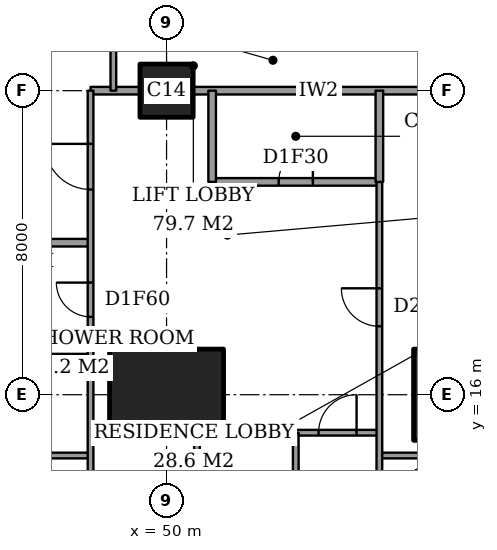
"""IFC4 building model, lengths in metres.
Left out: names, types, materials, properties, quantities, classifications, styles, units other than length and angle.
Written with IfcOpenShell. Run it as: python <this file> out.ifc"""

import sys

from ifc_helpers import new_model, si_unit, direction, frame, frame_2d, origin, origin_2d, place, context, subcontext, project, spatial, rectangle, extrude, element, fill, save


model = new_model("IFC4")
c1 = context("Model", 3, precision=1e-05, world=origin(), true_north=direction((0.0, 1.0)))
c2 = subcontext(c1, "Body", "Model", "MODEL_VIEW")
j1 = project(units=[si_unit("LENGTHUNIT", "METRE"), si_unit("PLANEANGLEUNIT", "RADIAN")], contexts=[c1])
p1 = place(None, origin())
s1 = spatial("IfcSite", under=j1, at=p1, CompositionType="ELEMENT")
p2 = place(p1, origin())
s2 = spatial("IfcBuilding", under=s1, at=p2, CompositionType="ELEMENT")
p3 = place(p2, frame((0.0, 0.0, 287.1)))
s3 = spatial("IfcBuildingStorey", under=s2, at=p3, CompositionType="ELEMENT", Elevation=287.1)
p4 = place(p3, frame((50.0, 16.0, 0.0), z_axis=(0.0, 0.0, 1.0), x_axis=(1.0, 0.0, 0.0)))
e1 = element("IfcColumn", 1, at=p4, inside=s3, PredefinedType="COLUMN", context=c2, shape_type="SweptSolid", body=[
    extrude(rectangle(XDim=3.0, YDim=2.4, at=origin_2d()), origin(), (0.0, 0.0, 1.0), 4.5),
])
p5 = place(p3, frame((50.0, 24.0, 0.0), z_axis=(0.0, 0.0, 1.0), x_axis=(1.0, 0.0, 0.0)))
e2 = element("IfcColumn", 2, at=p5, inside=s3, PredefinedType="COLUMN", context=c2, shape_type="SweptSolid", body=[
    extrude(rectangle(XDim=1.4, YDim=1.4, at=origin_2d()), origin(), (0.0, 0.0, 1.0), 4.5),
])
p6 = place(p3, frame((58.0, 16.0, 0.0), z_axis=(0.0, 0.0, 1.0), x_axis=(1.0, 0.0, 0.0)))
e3 = element("IfcColumn", 3, at=p6, inside=s3, PredefinedType="COLUMN", context=c2, shape_type="SweptSolid", body=[
    extrude(rectangle(XDim=3.0, YDim=2.4, at=origin_2d()), origin(), (0.0, 0.0, 1.0), 4.5),
])
p7 = place(p3, frame((45.6, 14.4, 0.0), z_axis=(0.0, 0.0, 1.0), x_axis=(1.0, 0.0, 0.0)))
e4 = element("IfcWall", 4, at=p7, inside=s3, PredefinedType="PARTITIONING", context=c2, shape_type="SweptSolid", body=[
    extrude(rectangle(XDim=2.4, YDim=0.15, at=frame_2d((1.2, 0.0))), origin(), (0.0, 0.0, 1.0), 4.2),
])
p8 = place(p3, frame((55.6, 14.4, 0.0), z_axis=(0.0, 0.0, 1.0), x_axis=(1.0, 0.0, 0.0)))
e5 = element("IfcWall", 5, at=p8, inside=s3, PredefinedType="PARTITIONING", context=c2, shape_type="SweptSolid", body=[
    extrude(rectangle(XDim=3.675, YDim=0.15, at=frame_2d((1.837, 0.0))), origin(), (0.0, 0.0, 1.0), 4.2),
])
p9 = place(p3, frame((48.0, 15.0, 0.0), z_axis=(0.0, 0.0, 1.0), x_axis=(1.0, 0.0, 0.0)))
e6 = element("IfcWall", 6, at=p9, inside=s3, PredefinedType="PARTITIONING", context=c2, shape_type="SweptSolid", body=[
    extrude(rectangle(XDim=0.5, YDim=0.15, at=frame_2d((0.25, 0.0))), origin(), (0.0, 0.0, 1.0), 4.2),
])
p10 = place(p3, frame((51.5, 15.0, 0.0), z_axis=(0.0, 0.0, 1.0), x_axis=(1.0, 0.0, 0.0)))
e7 = element("IfcWall", 7, at=p10, inside=s3, PredefinedType="PARTITIONING", context=c2, shape_type="SweptSolid", body=[
    extrude(rectangle(XDim=4.1, YDim=0.15, at=frame_2d((2.05, 0.0))), origin(), (0.0, 0.0, 1.0), 4.2),
])
p11 = place(p10, frame((2.5, 0.0, 0.0)))
e8 = element("IfcOpeningElement", 8, at=p11, cuts=e7, PredefinedType="OPENING", context=c2, shape_type="SweptSolid", body=[
    extrude(rectangle(XDim=1.0, YDim=2.1, at=frame_2d((0.5, 1.05))), frame((0.0, 0.085, 0.0), z_axis=(0.0, -1.0, 0.0), x_axis=(1.0, 0.0, 0.0)), (0.0, 0.0, 1.0), 0.17),
])
p12 = place(p3, frame((42.0, 17.0, 0.0), z_axis=(0.0, 0.0, 1.0), x_axis=(1.0, 0.0, 0.0)))
e9 = element("IfcWall", 9, at=p12, inside=s3, PredefinedType="PARTITIONING", context=c2, shape_type="SweptSolid", body=[
    extrude(rectangle(XDim=6.0, YDim=0.15, at=frame_2d((3.0, 0.0))), origin(), (0.0, 0.0, 1.0), 4.2),
])
p13 = place(p3, frame((42.0, 20.0, 0.0), z_axis=(0.0, 0.0, 1.0), x_axis=(1.0, 0.0, 0.0)))
e10 = element("IfcWall", 10, at=p13, inside=s3, PredefinedType="PARTITIONING", context=c2, shape_type="SweptSolid", body=[
    extrude(rectangle(XDim=6.0, YDim=0.2, at=frame_2d((3.0, 0.0))), origin(), (0.0, 0.0, 1.0), 4.2),
])
p14 = place(p3, frame((51.2, 21.6, 0.0), z_axis=(0.0, 0.0, 1.0), x_axis=(1.0, 0.0, 0.0)))
e11 = element("IfcWall", 11, at=p14, inside=s3, PredefinedType="PARTITIONING", context=c2, shape_type="SweptSolid", body=[
    extrude(rectangle(XDim=4.4, YDim=0.2, at=frame_2d((2.2, 0.0))), origin(), (0.0, 0.0, 1.0), 4.2),
])
p15 = place(p14, frame((1.75, 0.0, 0.0)))
e12 = element("IfcOpeningElement", 12, at=p15, cuts=e11, PredefinedType="OPENING", context=c2, shape_type="SweptSolid", body=[
    extrude(rectangle(XDim=0.9, YDim=2.1, at=frame_2d((0.45, 1.05))), frame((0.0, 0.11, 0.0), z_axis=(0.0, -1.0, 0.0), x_axis=(1.0, 0.0, 0.0)), (0.0, 0.0, 1.0), 0.22),
])
p16 = place(p3, frame((48.0, 24.0, 0.0), z_axis=(0.0, 0.0, 1.0), x_axis=(1.0, 0.0, 0.0)))
e13 = element("IfcWall", 13, at=p16, inside=s3, PredefinedType="PARTITIONING", context=c2, shape_type="SweptSolid", body=[
    extrude(rectangle(XDim=1.3, YDim=0.2, at=frame_2d((0.65, 0.0))), origin(), (0.0, 0.0, 1.0), 4.2),
])
p17 = place(p3, frame((50.7, 24.0, 0.0), z_axis=(0.0, 0.0, 1.0), x_axis=(1.0, 0.0, 0.0)))
e14 = element("IfcWall", 14, at=p17, inside=s3, PredefinedType="PARTITIONING", context=c2, shape_type="SweptSolid", body=[
    extrude(rectangle(XDim=6.6, YDim=0.2, at=frame_2d((3.3, 0.0))), origin(), (0.0, 0.0, 1.0), 4.2),
])
p18 = place(p3, frame((48.0, 10.6, 0.0), z_axis=(0.0, 0.0, 1.0), x_axis=(0.0, 1.0, 0.0)))
e15 = element("IfcWall", 15, at=p18, inside=s3, PredefinedType="PARTITIONING", context=c2, shape_type="SweptSolid", body=[
    extrude(rectangle(XDim=13.4, YDim=0.15, at=frame_2d((6.7, 0.0))), origin(), (0.0, 0.0, 1.0), 4.2),
])
p19 = place(p18, frame((10.8, 0.0, 0.0)))
e16 = element("IfcOpeningElement", 16, at=p19, cuts=e15, PredefinedType="OPENING", context=c2, shape_type="SweptSolid", body=[
    extrude(rectangle(XDim=1.2, YDim=2.4, at=frame_2d((0.6, 1.2))), frame((0.0, 0.085, 0.0), z_axis=(0.0, -1.0, 0.0), x_axis=(1.0, 0.0, 0.0)), (0.0, 0.0, 1.0), 0.17),
])
p20 = place(p18, frame((7.45, 0.0, 0.0)))
e17 = element("IfcOpeningElement", 17, at=p20, cuts=e15, PredefinedType="OPENING", context=c2, shape_type="SweptSolid", body=[
    extrude(rectangle(XDim=0.9, YDim=2.1, at=frame_2d((0.45, 1.05))), frame((0.0, 0.085, 0.0), z_axis=(0.0, -1.0, 0.0), x_axis=(1.0, 0.0, 0.0)), (0.0, 0.0, 1.0), 0.17),
])
p21 = place(p3, frame((48.6, 24.0, 0.0), z_axis=(0.0, 0.0, 1.0), x_axis=(0.0, 1.0, 0.0)))
e18 = element("IfcWall", 18, at=p21, inside=s3, PredefinedType="PARTITIONING", context=c2, shape_type="SweptSolid", body=[
    extrude(rectangle(XDim=1.6, YDim=0.15, at=frame_2d((0.8, 0.0))), origin(), (0.0, 0.0, 1.0), 4.2),
])
p22 = place(p3, frame((50.8, 10.6, 0.0), z_axis=(0.0, 0.0, 1.0), x_axis=(0.0, 1.0, 0.0)))
e19 = element("IfcWall", 19, at=p22, inside=s3, PredefinedType="PARTITIONING", context=c2, shape_type="SweptSolid", body=[
    extrude(rectangle(XDim=4.2, YDim=0.15, at=frame_2d((2.1, 0.0))), origin(), (0.0, 0.0, 1.0), 4.2),
])
p23 = place(p3, frame((51.2, 21.6, 0.0), z_axis=(0.0, 0.0, 1.0), x_axis=(0.0, 1.0, 0.0)))
e20 = element("IfcWall", 20, at=p23, inside=s3, PredefinedType="PARTITIONING", context=c2, shape_type="SweptSolid", body=[
    extrude(rectangle(XDim=2.4, YDim=0.2, at=frame_2d((1.2, 0.0))), origin(), (0.0, 0.0, 1.0), 4.2),
])
p24 = place(p3, frame((53.4, 10.6, 0.0), z_axis=(0.0, 0.0, 1.0), x_axis=(0.0, 1.0, 0.0)))
e21 = element("IfcWall", 21, at=p24, inside=s3, PredefinedType="PARTITIONING", context=c2, shape_type="SweptSolid", body=[
    extrude(rectangle(XDim=4.4, YDim=0.15, at=frame_2d((2.2, 0.0))), origin(), (0.0, 0.0, 1.0), 4.2),
])
p25 = place(p3, frame((55.6, 21.6, 0.0), z_axis=(0.0, 0.0, 1.0), x_axis=(0.0, 1.0, 0.0)))
e22 = element("IfcWall", 22, at=p25, inside=s3, PredefinedType="PARTITIONING", context=c2, shape_type="SweptSolid", body=[
    extrude(rectangle(XDim=2.4, YDim=0.2, at=frame_2d((1.2, 0.0))), origin(), (0.0, 0.0, 1.0), 4.2),
])
p26 = place(p3, frame((55.6, 10.6, 0.0), z_axis=(0.0, 0.0, 1.0), x_axis=(0.0, 1.0, 0.0)))
e23 = element("IfcWall", 23, at=p26, inside=s3, PredefinedType="PARTITIONING", context=c2, shape_type="SweptSolid", body=[
    extrude(rectangle(XDim=11.0, YDim=0.15, at=frame_2d((5.5, 0.0))), origin(), (0.0, 0.0, 1.0), 4.2),
])
p27 = place(p26, frame((7.2, 0.0, 0.0)))
e24 = element("IfcOpeningElement", 24, at=p27, cuts=e23, PredefinedType="OPENING", context=c2, shape_type="SweptSolid", body=[
    extrude(rectangle(XDim=1.0, YDim=2.1, at=frame_2d((0.5, 1.05))), frame((0.0, 0.085, 0.0), z_axis=(0.0, -1.0, 0.0), x_axis=(1.0, 0.0, 0.0)), (0.0, 0.0, 1.0), 0.17),
])
p28 = place(p27, origin())
e25 = element("IfcDoor", 25, at=p28, inside=s3, OperationType="SINGLE_SWING_LEFT", PredefinedType="DOOR", context=c2, shape_type="SweptSolid", body=[
    extrude(rectangle(XDim=1.0, YDim=2.1, at=frame_2d((0.5, 1.05))), frame((0.0, 0.025, 0.0), z_axis=(0.0, -1.0, 0.0), x_axis=(1.0, 0.0, 0.0)), (0.0, 0.0, 1.0), 0.05),
])
fill(e24, e25)
p29 = place(p15, origin())
e26 = element("IfcDoor", 26, at=p29, inside=s3, OperationType="SINGLE_SWING_LEFT", PredefinedType="DOOR", context=c2, shape_type="SweptSolid", body=[
    extrude(rectangle(XDim=0.9, YDim=2.1, at=frame_2d((0.45, 1.05))), frame((0.0, 0.025, 0.0), z_axis=(0.0, -1.0, 0.0), x_axis=(1.0, 0.0, 0.0)), (0.0, 0.0, 1.0), 0.05),
])
fill(e12, e26)
p30 = place(p19, origin())
e27 = element("IfcDoor", 27, at=p30, inside=s3, OperationType="SINGLE_SWING_LEFT", PredefinedType="DOOR", context=c2, shape_type="SweptSolid", body=[
    extrude(rectangle(XDim=1.2, YDim=2.4, at=frame_2d((0.6, 1.2))), frame((0.0, 0.025, 0.0), z_axis=(0.0, -1.0, 0.0), x_axis=(1.0, 0.0, 0.0)), (0.0, 0.0, 1.0), 0.05),
])
fill(e16, e27)
p31 = place(p11, origin())
e28 = element("IfcDoor", 28, at=p31, inside=s3, OperationType="SINGLE_SWING_LEFT", PredefinedType="DOOR", context=c2, shape_type="SweptSolid", body=[
    extrude(rectangle(XDim=1.0, YDim=2.1, at=frame_2d((0.5, 1.05))), frame((0.0, 0.025, 0.0), z_axis=(0.0, -1.0, 0.0), x_axis=(1.0, 0.0, 0.0)), (0.0, 0.0, 1.0), 0.05),
])
fill(e8, e28)
p32 = place(p20, origin())
e29 = element("IfcDoor", 29, at=p32, inside=s3, OperationType="SINGLE_SWING_LEFT", PredefinedType="DOOR", context=c2, shape_type="SweptSolid", body=[
    extrude(rectangle(XDim=0.9, YDim=2.1, at=frame_2d((0.45, 1.05))), frame((0.0, 0.025, 0.0), z_axis=(0.0, -1.0, 0.0), x_axis=(1.0, 0.0, 0.0)), (0.0, 0.0, 1.0), 0.05),
])
fill(e17, e29)
save(model, sys.argv[1])
